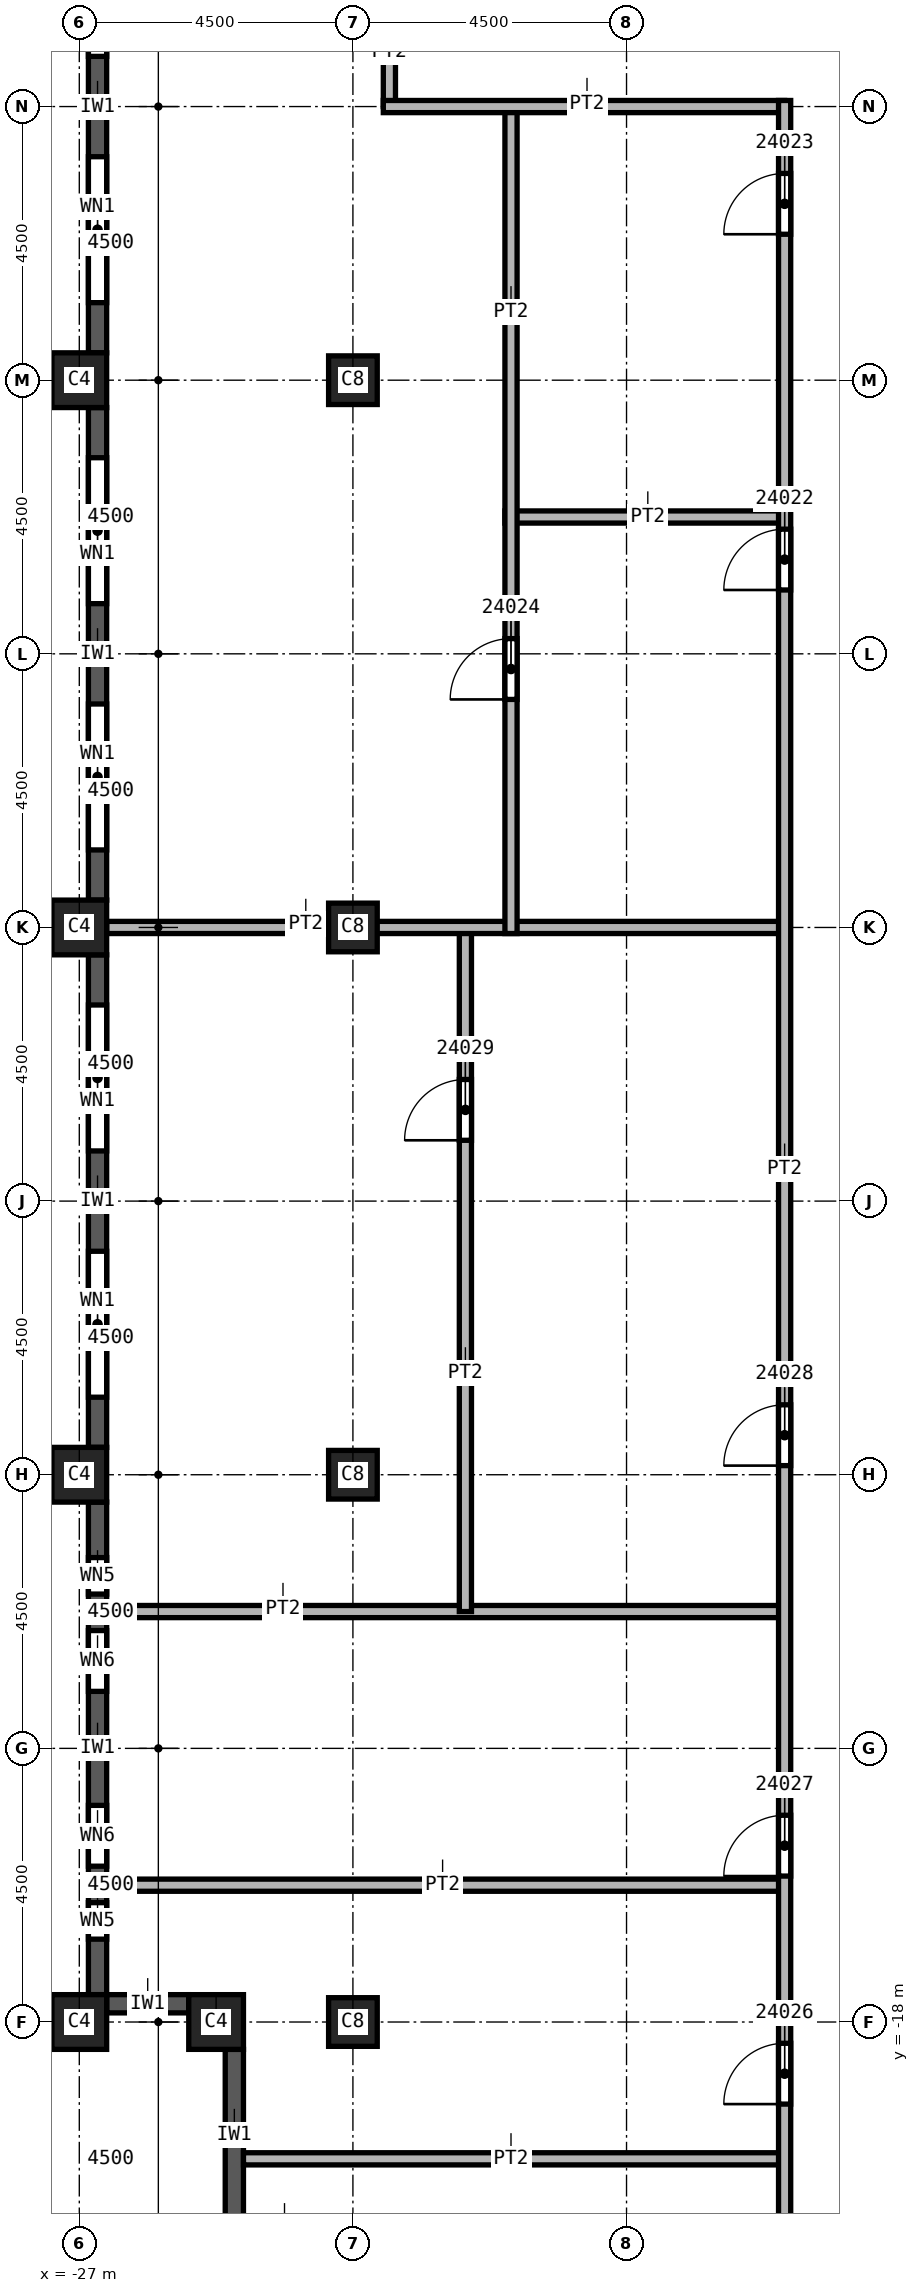
"""IFC4 building model, lengths in metres.
Left out: names, types, materials, properties, quantities, classifications, styles, units other than length and angle.
Written with IfcOpenShell. Run it as: python <this file> out.ifc"""

import sys

from ifc_helpers import new_model, si_unit, direction, frame, frame_2d, origin, origin_2d, place, context, subcontext, project, spatial, rectangle, extrude, element, fill, save


model = new_model("IFC4")
c1 = context("Model", 3, precision=1e-05, world=origin(), true_north=direction((0.0, 1.0)))
c2 = subcontext(c1, "Body", "Model", "MODEL_VIEW")
j1 = project(units=[si_unit("LENGTHUNIT", "METRE"), si_unit("PLANEANGLEUNIT", "RADIAN")], contexts=[c1])
p1 = place(None, origin())
s1 = spatial("IfcSite", under=j1, at=p1, CompositionType="ELEMENT")
p2 = place(p1, origin())
s2 = spatial("IfcBuilding", under=s1, at=p2, CompositionType="ELEMENT")
p3 = place(p2, frame((0.0, 0.0, 346.0)))
s3 = spatial("IfcBuildingStorey", under=s2, at=p3, CompositionType="ELEMENT", Elevation=346.0)
for number, where, z_axis, x_axis in (
    (1, (-22.5, 0.0, 0.0), (0.0, 0.0, 1.0), (1.0, 0.0, 0.0)),
    (2, (-22.5, 9.0, 0.0), (0.0, 0.0, 1.0), (1.0, 0.0, 0.0)),
    (3, (-22.5, -9.0, 0.0), (0.0, 0.0, 1.0), (1.0, 0.0, 0.0)),
    (4, (-22.5, -18.0, 0.0), (0.0, 0.0, 1.0), (1.0, 0.0, 0.0)),
):
    element("IfcColumn", number, at=place(p3, frame(where, z_axis=z_axis, x_axis=x_axis)), inside=s3, PredefinedType="COLUMN", context=c2, shape_type="SweptSolid", body=[
        extrude(rectangle(XDim=0.8, YDim=0.8, at=origin_2d()), origin(), (0.0, 0.0, 1.0), 3.59),
    ])
for number, where, z_axis, x_axis in (
    (5, (-27.0, 0.0, 0.0), (0.0, 0.0, 1.0), (0.0, 1.0, 0.0)),
    (6, (-27.0, 9.0, 0.0), (0.0, 0.0, 1.0), (0.0, 1.0, 0.0)),
    (7, (-27.0, -9.0, 0.0), (0.0, 0.0, 1.0), (0.0, 1.0, 0.0)),
    (8, (-27.0, -18.0, 0.0), (0.0, 0.0, 1.0), (0.0, 1.0, 0.0)),
    (9, (-24.75, -18.0, 0.0), (0.0, 0.0, 1.0), (1.0, 0.0, 0.0)),
):
    element("IfcColumn", number, at=place(p3, frame(where, z_axis=z_axis, x_axis=x_axis)), inside=s3, PredefinedType="COLUMN", context=c2, shape_type="SweptSolid", body=[
        extrude(rectangle(XDim=0.9, YDim=0.9, at=origin_2d()), origin(), (0.0, 0.0, 1.0), 3.59),
    ])
p4 = place(p3, frame((-26.7, 17.55, 0.0), z_axis=(0.0, 0.0, 1.0), x_axis=(0.0, -1.0, 0.0)))
e10 = element("IfcWall", 10, at=p4, inside=s3, PredefinedType="SOLIDWALL", context=c2, shape_type="SweptSolid", body=[
    extrude(rectangle(XDim=8.1, YDim=0.3, at=frame_2d((4.05, 0.0))), origin(), (0.0, 0.0, 1.0), 2.99),
])
p5 = place(p4, frame((0.825, 0.0, 0.8)))
e11 = element("IfcOpeningElement", 11, at=p5, cuts=e10, PredefinedType="OPENING", context=c2, shape_type="SweptSolid", body=[
    extrude(rectangle(XDim=2.4, YDim=1.95, at=frame_2d((1.2, 0.975))), frame((0.0, 0.15, 0.0), z_axis=(0.0, -1.0, 0.0), x_axis=(1.0, 0.0, 0.0)), (0.0, 0.0, 1.0), 0.3),
])
p6 = place(p4, frame((4.875, 0.0, 0.8)))
e12 = element("IfcOpeningElement", 12, at=p6, cuts=e10, PredefinedType="OPENING", context=c2, shape_type="SweptSolid", body=[
    extrude(rectangle(XDim=2.4, YDim=1.95, at=frame_2d((1.2, 0.975))), frame((0.0, 0.15, 0.0), z_axis=(0.0, -1.0, 0.0), x_axis=(1.0, 0.0, 0.0)), (0.0, 0.0, 1.0), 0.3),
])
p7 = place(p3, frame((-26.7, 8.55, 0.0), z_axis=(0.0, 0.0, 1.0), x_axis=(0.0, -1.0, 0.0)))
e13 = element("IfcWall", 13, at=p7, inside=s3, PredefinedType="SOLIDWALL", context=c2, shape_type="SweptSolid", body=[
    extrude(rectangle(XDim=8.1, YDim=0.3, at=frame_2d((4.05, 0.0))), origin(), (0.0, 0.0, 1.0), 2.99),
])
p8 = place(p7, frame((0.825, 0.0, 0.8)))
e14 = element("IfcOpeningElement", 14, at=p8, cuts=e13, PredefinedType="OPENING", context=c2, shape_type="SweptSolid", body=[
    extrude(rectangle(XDim=2.4, YDim=1.95, at=frame_2d((1.2, 0.975))), frame((0.0, 0.15, 0.0), z_axis=(0.0, -1.0, 0.0), x_axis=(1.0, 0.0, 0.0)), (0.0, 0.0, 1.0), 0.3),
])
p9 = place(p7, frame((4.875, 0.0, 0.8)))
e15 = element("IfcOpeningElement", 15, at=p9, cuts=e13, PredefinedType="OPENING", context=c2, shape_type="SweptSolid", body=[
    extrude(rectangle(XDim=2.4, YDim=1.95, at=frame_2d((1.2, 0.975))), frame((0.0, 0.15, 0.0), z_axis=(0.0, -1.0, 0.0), x_axis=(1.0, 0.0, 0.0)), (0.0, 0.0, 1.0), 0.3),
])
p10 = place(p3, frame((-26.7, -0.45, 0.0), z_axis=(0.0, 0.0, 1.0), x_axis=(0.0, -1.0, 0.0)))
e16 = element("IfcWall", 16, at=p10, inside=s3, PredefinedType="SOLIDWALL", context=c2, shape_type="SweptSolid", body=[
    extrude(rectangle(XDim=8.1, YDim=0.3, at=frame_2d((4.05, 0.0))), origin(), (0.0, 0.0, 1.0), 2.99),
])
p11 = place(p10, frame((0.825, 0.0, 0.8)))
e17 = element("IfcOpeningElement", 17, at=p11, cuts=e16, PredefinedType="OPENING", context=c2, shape_type="SweptSolid", body=[
    extrude(rectangle(XDim=2.4, YDim=1.95, at=frame_2d((1.2, 0.975))), frame((0.0, 0.15, 0.0), z_axis=(0.0, -1.0, 0.0), x_axis=(1.0, 0.0, 0.0)), (0.0, 0.0, 1.0), 0.3),
])
p12 = place(p10, frame((4.875, 0.0, 0.8)))
e18 = element("IfcOpeningElement", 18, at=p12, cuts=e16, PredefinedType="OPENING", context=c2, shape_type="SweptSolid", body=[
    extrude(rectangle(XDim=2.4, YDim=1.95, at=frame_2d((1.2, 0.975))), frame((0.0, 0.15, 0.0), z_axis=(0.0, -1.0, 0.0), x_axis=(1.0, 0.0, 0.0)), (0.0, 0.0, 1.0), 0.3),
])
p13 = place(p3, frame((-26.7, -9.45, 0.0), z_axis=(0.0, 0.0, 1.0), x_axis=(0.0, -1.0, 0.0)))
e19 = element("IfcWall", 19, at=p13, inside=s3, PredefinedType="SOLIDWALL", context=c2, shape_type="SweptSolid", body=[
    extrude(rectangle(XDim=8.1, YDim=0.3, at=frame_2d((4.05, 0.0))), origin(), (0.0, 0.0, 1.0), 2.99),
])
p14 = place(p13, frame((0.913, 0.0, 0.8)))
e20 = element("IfcOpeningElement", 20, at=p14, cuts=e19, PredefinedType="OPENING", context=c2, shape_type="SweptSolid", body=[
    extrude(rectangle(XDim=0.6, YDim=1.95, at=frame_2d((0.3, 0.975))), frame((0.0, 0.15, 0.0), z_axis=(0.0, -1.0, 0.0), x_axis=(1.0, 0.0, 0.0)), (0.0, 0.0, 1.0), 0.3),
])
p15 = place(p13, frame((2.113, 0.0, 0.8)))
e21 = element("IfcOpeningElement", 21, at=p15, cuts=e19, PredefinedType="OPENING", context=c2, shape_type="SweptSolid", body=[
    extrude(rectangle(XDim=1.0, YDim=1.95, at=frame_2d((0.5, 0.975))), frame((0.0, 0.15, 0.0), z_axis=(0.0, -1.0, 0.0), x_axis=(1.0, 0.0, 0.0)), (0.0, 0.0, 1.0), 0.3),
])
p16 = place(p13, frame((4.988, 0.0, 0.8)))
e22 = element("IfcOpeningElement", 22, at=p16, cuts=e19, PredefinedType="OPENING", context=c2, shape_type="SweptSolid", body=[
    extrude(rectangle(XDim=1.0, YDim=1.95, at=frame_2d((0.5, 0.975))), frame((0.0, 0.15, 0.0), z_axis=(0.0, -1.0, 0.0), x_axis=(1.0, 0.0, 0.0)), (0.0, 0.0, 1.0), 0.3),
])
p17 = place(p13, frame((6.587, 0.0, 0.8)))
e23 = element("IfcOpeningElement", 23, at=p17, cuts=e19, PredefinedType="OPENING", context=c2, shape_type="SweptSolid", body=[
    extrude(rectangle(XDim=0.6, YDim=1.95, at=frame_2d((0.3, 0.975))), frame((0.0, 0.15, 0.0), z_axis=(0.0, -1.0, 0.0), x_axis=(1.0, 0.0, 0.0)), (0.0, 0.0, 1.0), 0.3),
])
p18 = place(p3, frame((-26.55, -17.7, 0.0), z_axis=(0.0, 0.0, 1.0), x_axis=(1.0, 0.0, 0.0)))
e24 = element("IfcWall", 24, at=p18, inside=s3, PredefinedType="SOLIDWALL", context=c2, shape_type="SweptSolid", body=[
    extrude(rectangle(XDim=1.35, YDim=0.3, at=frame_2d((0.675, 0.0))), origin(), (0.0, 0.0, 1.0), 2.99),
])
p19 = place(p3, frame((-24.45, -18.45, 0.0), z_axis=(0.0, 0.0, 1.0), x_axis=(0.0, -1.0, 0.0)))
e25 = element("IfcWall", 25, at=p19, inside=s3, PredefinedType="SOLIDWALL", context=c2, shape_type="SweptSolid", body=[
    extrude(rectangle(XDim=2.8, YDim=0.3, at=frame_2d((1.4, 0.0))), origin(), (0.0, 0.0, 1.0), 2.99),
])
for number, where, z_axis, x_axis in (
    (26, (-26.55, -15.75, 0.0), (0.0, 0.0, 1.0), (1.0, 0.0, 0.0)),
    (27, (-26.55, -11.25, 0.0), (0.0, 0.0, 1.0), (1.0, 0.0, 0.0)),
):
    element("IfcWall", number, at=place(p3, frame(where, z_axis=z_axis, x_axis=x_axis)), inside=s3, PredefinedType="PARTITIONING", context=c2, shape_type="SweptSolid", body=[
        extrude(rectangle(XDim=11.15, YDim=0.2, at=frame_2d((5.575, 0.0))), origin(), (0.0, 0.0, 1.0), 3.59),
    ])
p20 = place(p3, frame((-24.3, -20.25, 0.0), z_axis=(0.0, 0.0, 1.0), x_axis=(1.0, 0.0, 0.0)))
e28 = element("IfcWall", 28, at=p20, inside=s3, PredefinedType="PARTITIONING", context=c2, shape_type="SweptSolid", body=[
    extrude(rectangle(XDim=8.9, YDim=0.2, at=frame_2d((4.45, 0.0))), origin(), (0.0, 0.0, 1.0), 3.59),
])
p21 = place(p3, frame((-21.9, 13.5, 0.0), z_axis=(0.0, 0.0, 1.0), x_axis=(0.0, 1.0, 0.0)))
e29 = element("IfcWall", 29, at=p21, inside=s3, PredefinedType="PARTITIONING", context=c2, shape_type="SweptSolid", body=[
    extrude(rectangle(XDim=1.7, YDim=0.2, at=frame_2d((0.85, 0.0))), origin(), (0.0, 0.0, 1.0), 3.59),
])
p22 = place(p3, frame((-20.65, -11.25, 0.0), z_axis=(0.0, 0.0, 1.0), x_axis=(0.0, 1.0, 0.0)))
e30 = element("IfcWall", 30, at=p22, inside=s3, PredefinedType="PARTITIONING", context=c2, shape_type="SweptSolid", body=[
    extrude(rectangle(XDim=11.25, YDim=0.2, at=frame_2d((5.625, 0.0))), origin(), (0.0, 0.0, 1.0), 3.59),
])
p23 = place(p22, frame((7.75, 0.0, 0.0)))
e31 = element("IfcOpeningElement", 31, at=p23, cuts=e30, PredefinedType="OPENING", context=c2, shape_type="SweptSolid", body=[
    extrude(rectangle(XDim=1.0, YDim=2.1, at=frame_2d((0.5, 1.05))), frame((0.0, 0.1, 0.0), z_axis=(0.0, -1.0, 0.0), x_axis=(1.0, 0.0, 0.0)), (0.0, 0.0, 1.0), 0.2),
])
p24 = place(p3, frame((-15.4, 0.0, 0.0), z_axis=(0.0, 0.0, 1.0), x_axis=(-1.0, 0.0, 0.0)))
e32 = element("IfcWall", 32, at=p24, inside=s3, PredefinedType="PARTITIONING", context=c2, shape_type="SweptSolid", body=[
    extrude(rectangle(XDim=11.15, YDim=0.2, at=frame_2d((5.575, 0.0))), origin(), (0.0, 0.0, 1.0), 3.59),
])
p25 = place(p3, frame((-20.0, 6.75, 0.0), z_axis=(0.0, 0.0, 1.0), x_axis=(1.0, 0.0, 0.0)))
e33 = element("IfcWall", 33, at=p25, inside=s3, PredefinedType="PARTITIONING", context=c2, shape_type="SweptSolid", body=[
    extrude(rectangle(XDim=4.6, YDim=0.2, at=frame_2d((2.3, 0.0))), origin(), (0.0, 0.0, 1.0), 3.59),
])
p26 = place(p3, frame((-19.9, -0.1, 0.0), z_axis=(0.0, 0.0, 1.0), x_axis=(0.0, 1.0, 0.0)))
e34 = element("IfcWall", 34, at=p26, inside=s3, PredefinedType="PARTITIONING", context=c2, shape_type="SweptSolid", body=[
    extrude(rectangle(XDim=13.6, YDim=0.2, at=frame_2d((6.8, 0.0))), origin(), (0.0, 0.0, 1.0), 3.59),
])
p27 = place(p26, frame((3.85, 0.0, 0.0)))
e35 = element("IfcOpeningElement", 35, at=p27, cuts=e34, PredefinedType="OPENING", context=c2, shape_type="SweptSolid", body=[
    extrude(rectangle(XDim=1.0, YDim=2.1, at=frame_2d((0.5, 1.05))), frame((0.0, 0.1, 0.0), z_axis=(0.0, -1.0, 0.0), x_axis=(1.0, 0.0, 0.0)), (0.0, 0.0, 1.0), 0.2),
])
p28 = place(p3, frame((-15.4, 13.5, 0.0), z_axis=(0.0, 0.0, 1.0), x_axis=(-1.0, 0.0, 0.0)))
e36 = element("IfcWall", 36, at=p28, inside=s3, PredefinedType="PARTITIONING", context=c2, shape_type="SweptSolid", body=[
    extrude(rectangle(XDim=6.6, YDim=0.2, at=frame_2d((3.3, 0.0))), origin(), (0.0, 0.0, 1.0), 3.59),
])
p29 = place(p3, frame((-15.4, -24.95, 0.0), z_axis=(0.0, 0.0, 1.0), x_axis=(0.0, 1.0, 0.0)))
e37 = element("IfcWall", 37, at=p29, inside=s3, PredefinedType="PARTITIONING", context=c2, shape_type="SweptSolid", body=[
    extrude(rectangle(XDim=38.55, YDim=0.2, at=frame_2d((19.275, 0.0))), origin(), (0.0, 0.0, 1.0), 3.59),
])
p30 = place(p29, frame((30.5, 0.0, 0.0)))
e38 = element("IfcOpeningElement", 38, at=p30, cuts=e37, PredefinedType="OPENING", context=c2, shape_type="SweptSolid", body=[
    extrude(rectangle(XDim=1.0, YDim=2.1, at=frame_2d((0.5, 1.05))), frame((0.0, 0.1, 0.0), z_axis=(0.0, -1.0, 0.0), x_axis=(1.0, 0.0, 0.0)), (0.0, 0.0, 1.0), 0.2),
])
p31 = place(p29, frame((36.35, 0.0, 0.0)))
e39 = element("IfcOpeningElement", 39, at=p31, cuts=e37, PredefinedType="OPENING", context=c2, shape_type="SweptSolid", body=[
    extrude(rectangle(XDim=1.0, YDim=2.1, at=frame_2d((0.5, 1.05))), frame((0.0, 0.1, 0.0), z_axis=(0.0, -1.0, 0.0), x_axis=(1.0, 0.0, 0.0)), (0.0, 0.0, 1.0), 0.2),
])
p32 = place(p29, frame((1.9, 0.0, 0.0)))
e40 = element("IfcOpeningElement", 40, at=p32, cuts=e37, PredefinedType="OPENING", context=c2, shape_type="SweptSolid", body=[
    extrude(rectangle(XDim=1.0, YDim=2.1, at=frame_2d((0.5, 1.05))), frame((0.0, 0.1, 0.0), z_axis=(0.0, -1.0, 0.0), x_axis=(1.0, 0.0, 0.0)), (0.0, 0.0, 1.0), 0.2),
])
p33 = place(p29, frame((5.6, 0.0, 0.0)))
e41 = element("IfcOpeningElement", 41, at=p33, cuts=e37, PredefinedType="OPENING", context=c2, shape_type="SweptSolid", body=[
    extrude(rectangle(XDim=1.0, YDim=2.1, at=frame_2d((0.5, 1.05))), frame((0.0, 0.1, 0.0), z_axis=(0.0, -1.0, 0.0), x_axis=(1.0, 0.0, 0.0)), (0.0, 0.0, 1.0), 0.2),
])
p34 = place(p29, frame((9.35, 0.0, 0.0)))
e42 = element("IfcOpeningElement", 42, at=p34, cuts=e37, PredefinedType="OPENING", context=c2, shape_type="SweptSolid", body=[
    extrude(rectangle(XDim=1.0, YDim=2.1, at=frame_2d((0.5, 1.05))), frame((0.0, 0.1, 0.0), z_axis=(0.0, -1.0, 0.0), x_axis=(1.0, 0.0, 0.0)), (0.0, 0.0, 1.0), 0.2),
])
p35 = place(p29, frame((16.1, 0.0, 0.0)))
e43 = element("IfcOpeningElement", 43, at=p35, cuts=e37, PredefinedType="OPENING", context=c2, shape_type="SweptSolid", body=[
    extrude(rectangle(XDim=1.0, YDim=2.1, at=frame_2d((0.5, 1.05))), frame((0.0, 0.1, 0.0), z_axis=(0.0, -1.0, 0.0), x_axis=(1.0, 0.0, 0.0)), (0.0, 0.0, 1.0), 0.2),
])
p36 = place(p5, origin())
e44 = element("IfcWindow", 44, at=p36, inside=s3, PartitioningType="SINGLE_PANEL", PredefinedType="WINDOW", context=c2, shape_type="SweptSolid", body=[
    extrude(rectangle(XDim=2.4, YDim=1.95, at=frame_2d((1.2, 0.975))), frame((0.0, 0.03, 0.0), z_axis=(0.0, -1.0, 0.0), x_axis=(1.0, 0.0, 0.0)), (0.0, 0.0, 1.0), 0.06),
])
fill(e11, e44)
p37 = place(p6, origin())
e45 = element("IfcWindow", 45, at=p37, inside=s3, PartitioningType="SINGLE_PANEL", PredefinedType="WINDOW", context=c2, shape_type="SweptSolid", body=[
    extrude(rectangle(XDim=2.4, YDim=1.95, at=frame_2d((1.2, 0.975))), frame((0.0, 0.03, 0.0), z_axis=(0.0, -1.0, 0.0), x_axis=(1.0, 0.0, 0.0)), (0.0, 0.0, 1.0), 0.06),
])
fill(e12, e45)
p38 = place(p8, origin())
e46 = element("IfcWindow", 46, at=p38, inside=s3, PartitioningType="SINGLE_PANEL", PredefinedType="WINDOW", context=c2, shape_type="SweptSolid", body=[
    extrude(rectangle(XDim=2.4, YDim=1.95, at=frame_2d((1.2, 0.975))), frame((0.0, 0.03, 0.0), z_axis=(0.0, -1.0, 0.0), x_axis=(1.0, 0.0, 0.0)), (0.0, 0.0, 1.0), 0.06),
])
fill(e14, e46)
p39 = place(p9, origin())
e47 = element("IfcWindow", 47, at=p39, inside=s3, PartitioningType="SINGLE_PANEL", PredefinedType="WINDOW", context=c2, shape_type="SweptSolid", body=[
    extrude(rectangle(XDim=2.4, YDim=1.95, at=frame_2d((1.2, 0.975))), frame((0.0, 0.03, 0.0), z_axis=(0.0, -1.0, 0.0), x_axis=(1.0, 0.0, 0.0)), (0.0, 0.0, 1.0), 0.06),
])
fill(e15, e47)
p40 = place(p11, origin())
e48 = element("IfcWindow", 48, at=p40, inside=s3, PartitioningType="SINGLE_PANEL", PredefinedType="WINDOW", context=c2, shape_type="SweptSolid", body=[
    extrude(rectangle(XDim=2.4, YDim=1.95, at=frame_2d((1.2, 0.975))), frame((0.0, 0.03, 0.0), z_axis=(0.0, -1.0, 0.0), x_axis=(1.0, 0.0, 0.0)), (0.0, 0.0, 1.0), 0.06),
])
fill(e17, e48)
p41 = place(p12, origin())
e49 = element("IfcWindow", 49, at=p41, inside=s3, PartitioningType="SINGLE_PANEL", PredefinedType="WINDOW", context=c2, shape_type="SweptSolid", body=[
    extrude(rectangle(XDim=2.4, YDim=1.95, at=frame_2d((1.2, 0.975))), frame((0.0, 0.03, 0.0), z_axis=(0.0, -1.0, 0.0), x_axis=(1.0, 0.0, 0.0)), (0.0, 0.0, 1.0), 0.06),
])
fill(e18, e49)
p42 = place(p30, origin())
e50 = element("IfcDoor", 50, at=p42, inside=s3, OperationType="SINGLE_SWING_LEFT", PredefinedType="DOOR", context=c2, shape_type="SweptSolid", body=[
    extrude(rectangle(XDim=1.0, YDim=2.1, at=frame_2d((0.5, 1.05))), frame((0.0, 0.025, 0.0), z_axis=(0.0, -1.0, 0.0), x_axis=(1.0, 0.0, 0.0)), (0.0, 0.0, 1.0), 0.05),
])
fill(e38, e50)
p43 = place(p31, origin())
e51 = element("IfcDoor", 51, at=p43, inside=s3, OperationType="SINGLE_SWING_RIGHT", PredefinedType="DOOR", context=c2, shape_type="SweptSolid", body=[
    extrude(rectangle(XDim=1.0, YDim=2.1, at=frame_2d((0.5, 1.05))), frame((0.0, 0.025, 0.0), z_axis=(0.0, -1.0, 0.0), x_axis=(1.0, 0.0, 0.0)), (0.0, 0.0, 1.0), 0.05),
])
fill(e39, e51)
p44 = place(p27, origin())
e52 = element("IfcDoor", 52, at=p44, inside=s3, OperationType="SINGLE_SWING_LEFT", PredefinedType="DOOR", context=c2, shape_type="SweptSolid", body=[
    extrude(rectangle(XDim=1.0, YDim=2.1, at=frame_2d((0.5, 1.05))), frame((0.0, 0.025, 0.0), z_axis=(0.0, -1.0, 0.0), x_axis=(1.0, 0.0, 0.0)), (0.0, 0.0, 1.0), 0.05),
])
fill(e35, e52)
p45 = place(p33, origin())
e53 = element("IfcDoor", 53, at=p45, inside=s3, OperationType="SINGLE_SWING_LEFT", PredefinedType="DOOR", context=c2, shape_type="SweptSolid", body=[
    extrude(rectangle(XDim=1.0, YDim=2.1, at=frame_2d((0.5, 1.05))), frame((0.0, 0.025, 0.0), z_axis=(0.0, -1.0, 0.0), x_axis=(1.0, 0.0, 0.0)), (0.0, 0.0, 1.0), 0.05),
])
fill(e41, e53)
p46 = place(p34, origin())
e54 = element("IfcDoor", 54, at=p46, inside=s3, OperationType="SINGLE_SWING_RIGHT", PredefinedType="DOOR", context=c2, shape_type="SweptSolid", body=[
    extrude(rectangle(XDim=1.0, YDim=2.1, at=frame_2d((0.5, 1.05))), frame((0.0, 0.025, 0.0), z_axis=(0.0, -1.0, 0.0), x_axis=(1.0, 0.0, 0.0)), (0.0, 0.0, 1.0), 0.05),
])
fill(e42, e54)
p47 = place(p35, origin())
e55 = element("IfcDoor", 55, at=p47, inside=s3, OperationType="SINGLE_SWING_LEFT", PredefinedType="DOOR", context=c2, shape_type="SweptSolid", body=[
    extrude(rectangle(XDim=1.0, YDim=2.1, at=frame_2d((0.5, 1.05))), frame((0.0, 0.025, 0.0), z_axis=(0.0, -1.0, 0.0), x_axis=(1.0, 0.0, 0.0)), (0.0, 0.0, 1.0), 0.05),
])
fill(e43, e55)
p48 = place(p23, origin())
e56 = element("IfcDoor", 56, at=p48, inside=s3, OperationType="SINGLE_SWING_RIGHT", PredefinedType="DOOR", context=c2, shape_type="SweptSolid", body=[
    extrude(rectangle(XDim=1.0, YDim=2.1, at=frame_2d((0.5, 1.05))), frame((0.0, 0.025, 0.0), z_axis=(0.0, -1.0, 0.0), x_axis=(1.0, 0.0, 0.0)), (0.0, 0.0, 1.0), 0.05),
])
fill(e31, e56)
p49 = place(p14, origin())
e57 = element("IfcWindow", 57, at=p49, inside=s3, PartitioningType="SINGLE_PANEL", PredefinedType="WINDOW", context=c2, shape_type="SweptSolid", body=[
    extrude(rectangle(XDim=0.6, YDim=1.95, at=frame_2d((0.3, 0.975))), frame((0.0, 0.03, 0.0), z_axis=(0.0, -1.0, 0.0), x_axis=(1.0, 0.0, 0.0)), (0.0, 0.0, 1.0), 0.06),
])
fill(e20, e57)
p50 = place(p15, origin())
e58 = element("IfcWindow", 58, at=p50, inside=s3, PartitioningType="SINGLE_PANEL", PredefinedType="WINDOW", context=c2, shape_type="SweptSolid", body=[
    extrude(rectangle(XDim=1.0, YDim=1.95, at=frame_2d((0.5, 0.975))), frame((0.0, 0.03, 0.0), z_axis=(0.0, -1.0, 0.0), x_axis=(1.0, 0.0, 0.0)), (0.0, 0.0, 1.0), 0.06),
])
fill(e21, e58)
p51 = place(p16, origin())
e59 = element("IfcWindow", 59, at=p51, inside=s3, PartitioningType="SINGLE_PANEL", PredefinedType="WINDOW", context=c2, shape_type="SweptSolid", body=[
    extrude(rectangle(XDim=1.0, YDim=1.95, at=frame_2d((0.5, 0.975))), frame((0.0, 0.03, 0.0), z_axis=(0.0, -1.0, 0.0), x_axis=(1.0, 0.0, 0.0)), (0.0, 0.0, 1.0), 0.06),
])
fill(e22, e59)
p52 = place(p17, origin())
e60 = element("IfcWindow", 60, at=p52, inside=s3, PartitioningType="SINGLE_PANEL", PredefinedType="WINDOW", context=c2, shape_type="SweptSolid", body=[
    extrude(rectangle(XDim=0.6, YDim=1.95, at=frame_2d((0.3, 0.975))), frame((0.0, 0.03, 0.0), z_axis=(0.0, -1.0, 0.0), x_axis=(1.0, 0.0, 0.0)), (0.0, 0.0, 1.0), 0.06),
])
fill(e23, e60)
save(model, sys.argv[1])
